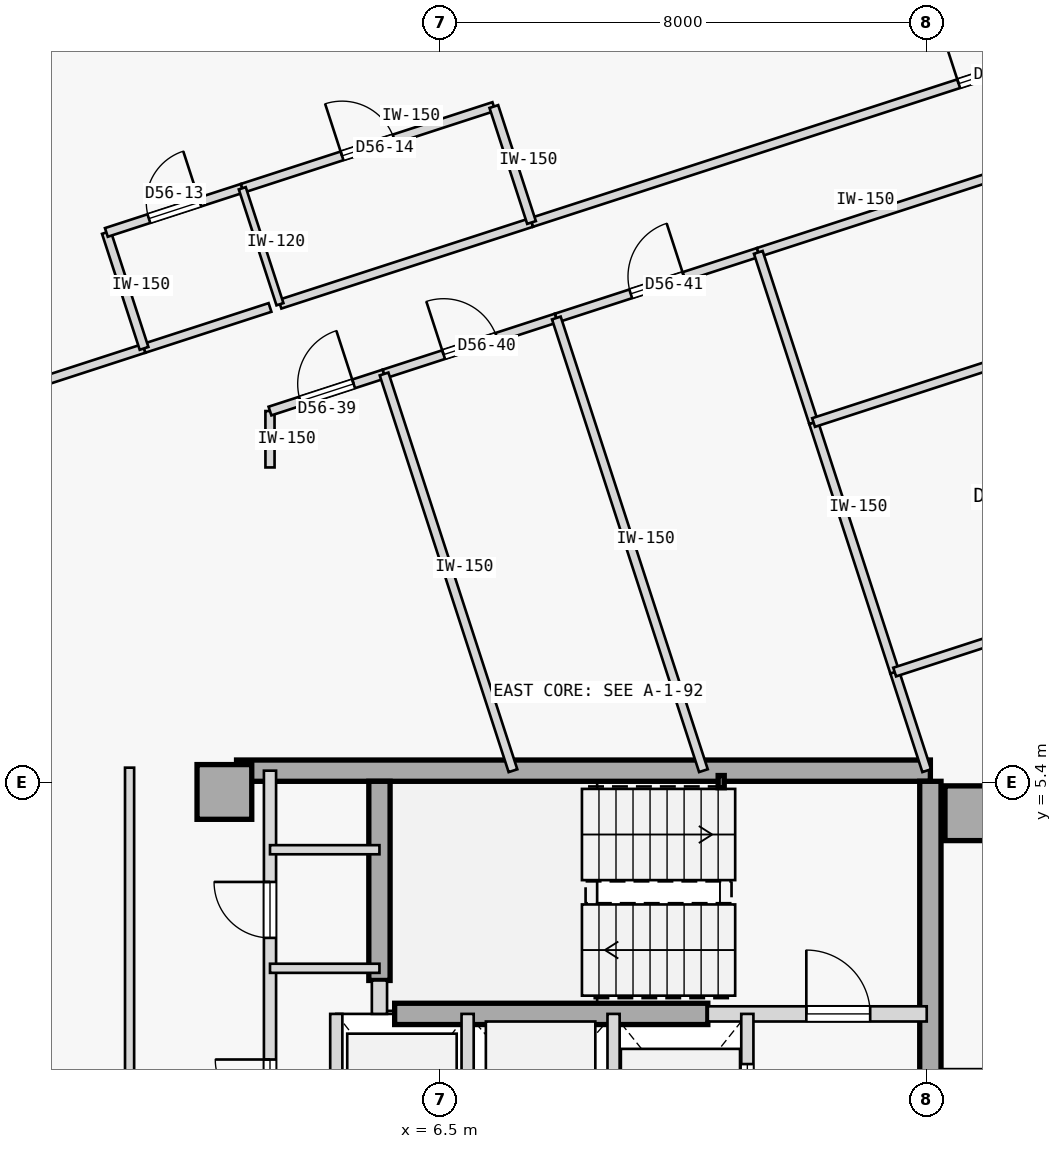
"""IFC4 building model, lengths in metres.
Left out: names, types, materials, properties, quantities, classifications, styles, units other than length and angle.
Written with IfcOpenShell. Run it as: python <this file> out.ifc"""

import sys

from ifc_helpers import new_model, si_unit, direction, frame, frame_2d, origin, origin_2d, place, context, subcontext, project, spatial, rectangle, hollow_rectangle, extrude, element, fill, save


model = new_model("IFC4")
c1 = context("Model", 3, precision=1e-05, world=origin(), true_north=direction((0.0, 1.0)))
c2 = subcontext(c1, "Body", "Model", "MODEL_VIEW")
j1 = project(units=[si_unit("LENGTHUNIT", "METRE"), si_unit("PLANEANGLEUNIT", "RADIAN")], contexts=[c1])
p1 = place(None, origin())
s1 = spatial("IfcSite", under=j1, at=p1, CompositionType="ELEMENT")
p2 = place(p1, origin())
s2 = spatial("IfcBuilding", under=s1, at=p2, CompositionType="ELEMENT")
p3 = place(p2, frame((0.0, 0.0, 214.25)))
s3 = spatial("IfcBuildingStorey", under=s2, at=p3, CompositionType="ELEMENT", Elevation=214.25)
for number, where, z_axis, x_axis in (
    (1, (15.25, 4.9, 0.0), (0.0, 0.0, 1.0), (1.0, 0.0, 0.0)),
    (2, (2.95, 5.25, 0.0), (0.0, 0.0, 1.0), (1.0, 0.0, 0.0)),
):
    element("IfcColumn", number, at=place(p3, frame(where, z_axis=z_axis, x_axis=x_axis)), inside=s3, PredefinedType="COLUMN", context=c2, shape_type="SweptSolid", body=[
        extrude(rectangle(XDim=0.9, YDim=0.9, at=origin_2d()), origin(), (0.0, 0.0, 1.0), 3.35),
    ])
p4 = place(p3, frame((3.15, 5.6, 0.0), z_axis=(0.0, 0.0, 1.0), x_axis=(1.0, 0.0, 0.0)))
e3 = element("IfcWall", 3, at=p4, inside=s3, PredefinedType="SHEAR", context=c2, shape_type="SweptSolid", body=[
    extrude(rectangle(XDim=11.41, YDim=0.35, at=frame_2d((5.705, 0.0))), origin(), (0.0, 0.0, 1.0), 3.125),
])
p5 = place(p3, frame((14.56, -5.425, 0.0), z_axis=(0.0, 0.0, 1.0), x_axis=(0.0, 1.0, 0.0)))
e4 = element("IfcWall", 4, at=p5, inside=s3, PredefinedType="SHEAR", context=c2, shape_type="SweptSolid", body=[
    extrude(rectangle(XDim=10.85, YDim=0.35, at=frame_2d((5.425, 0.0))), origin(), (0.0, 0.0, 1.0), 3.125),
])
p6 = place(p3, frame((5.5, 2.15, 0.0), z_axis=(0.0, 0.0, 1.0), x_axis=(0.0, 1.0, 0.0)))
e5 = element("IfcWall", 5, at=p6, inside=s3, PredefinedType="SHEAR", context=c2, shape_type="SweptSolid", body=[
    extrude(rectangle(XDim=3.275, YDim=0.35, at=frame_2d((1.638, 0.0))), origin(), (0.0, 0.0, 1.0), 3.125),
])
p7 = place(p3, frame((5.75, 1.6, 0.0), z_axis=(0.0, 0.0, 1.0), x_axis=(1.0, 0.0, 0.0)))
e6 = element("IfcWall", 6, at=p7, inside=s3, PredefinedType="SHEAR", context=c2, shape_type="SweptSolid", body=[
    extrude(rectangle(XDim=5.15, YDim=0.35, at=frame_2d((2.575, 0.0))), origin(), (0.0, 0.0, 1.0), 3.125),
])
p8 = place(p3, frame((11.12, 5.42, 0.0), z_axis=(0.0, 0.0, 1.0), x_axis=(1.0, 0.0, 0.0)))
e7 = element("IfcColumn", 7, at=p8, inside=s3, PredefinedType="COLUMN", context=c2, shape_type="SweptSolid", body=[
    extrude(hollow_rectangle(XDim=0.1, YDim=0.2, WallThickness=0.008, at=origin_2d()), origin(), (0.0, 0.0, 1.0), 3.35),
])
p9 = place(p3, frame((10.9, 1.6, 0.0), z_axis=(0.0, 0.0, 1.0), x_axis=(1.0, 0.0, 0.0)))
e8 = element("IfcWall", 8, at=p9, inside=s3, PredefinedType="STANDARD", context=c2, shape_type="SweptSolid", body=[
    extrude(rectangle(XDim=3.6, YDim=0.25, at=frame_2d((1.8, 0.0))), origin(), (0.0, 0.0, 1.0), 3.125),
])
p10 = place(p9, frame((1.62, 0.0, 0.0)))
e9 = element("IfcOpeningElement", 9, at=p10, cuts=e8, PredefinedType="OPENING", context=c2, shape_type="SweptSolid", body=[
    extrude(rectangle(XDim=1.05, YDim=2.15, at=frame_2d((0.525, 1.075))), frame((0.0, 0.135, 0.0), z_axis=(0.0, -1.0, 0.0), x_axis=(1.0, 0.0, 0.0)), (0.0, 0.0, 1.0), 0.27),
])
p11 = place(p3, frame((5.5, 1.6, 0.0), z_axis=(0.0, 0.0, 1.0), x_axis=(0.0, 1.0, 0.0)))
e10 = element("IfcWall", 10, at=p11, inside=s3, PredefinedType="STANDARD", context=c2, shape_type="SweptSolid", body=[
    extrude(rectangle(XDim=0.55, YDim=0.25, at=frame_2d((0.275, 0.0))), origin(), (0.0, 0.0, 1.0), 3.125),
])
p12 = place(p3, frame((3.7, -1.15, 0.0), z_axis=(0.0, 0.0, 1.0), x_axis=(0.0, 1.0, 0.0)))
e11 = element("IfcWall", 11, at=p12, inside=s3, PredefinedType="STANDARD", context=c2, shape_type="SweptSolid", body=[
    extrude(rectangle(XDim=6.75, YDim=0.2, at=frame_2d((3.375, 0.0))), origin(), (0.0, 0.0, 1.0), 3.125),
])
p13 = place(p12, frame((1.1, 0.0, 0.0)))
e12 = element("IfcOpeningElement", 12, at=p13, cuts=e11, PredefinedType="OPENING", context=c2, shape_type="SweptSolid", body=[
    extrude(rectangle(XDim=0.9, YDim=2.15, at=frame_2d((0.45, 1.075))), frame((0.0, 0.11, 0.0), z_axis=(0.0, -1.0, 0.0), x_axis=(1.0, 0.0, 0.0)), (0.0, 0.0, 1.0), 0.22),
])
p14 = place(p12, frame((4.0, 0.0, 0.0)))
e13 = element("IfcOpeningElement", 13, at=p14, cuts=e11, PredefinedType="OPENING", context=c2, shape_type="SweptSolid", body=[
    extrude(rectangle(XDim=0.92, YDim=2.15, at=frame_2d((0.46, 1.075))), frame((0.0, 0.11, 0.0), z_axis=(0.0, -1.0, 0.0), x_axis=(1.0, 0.0, 0.0)), (0.0, 0.0, 1.0), 0.22),
])
p15 = place(p3, frame((11.55, -1.15, 0.0), z_axis=(0.0, 0.0, 1.0), x_axis=(0.0, 1.0, 0.0)))
e14 = element("IfcWall", 14, at=p15, inside=s3, PredefinedType="STANDARD", context=c2, shape_type="SweptSolid", body=[
    extrude(rectangle(XDim=2.75, YDim=0.2, at=frame_2d((1.375, 0.0))), origin(), (0.0, 0.0, 1.0), 3.125),
])
p16 = place(p15, frame((0.825, 0.0, 0.0)))
e15 = element("IfcOpeningElement", 15, at=p16, cuts=e14, PredefinedType="OPENING", context=c2, shape_type="SweptSolid", body=[
    extrude(rectangle(XDim=1.1, YDim=2.15, at=frame_2d((0.55, 1.075))), frame((0.0, 0.11, 0.0), z_axis=(0.0, -1.0, 0.0), x_axis=(1.0, 0.0, 0.0)), (0.0, 0.0, 1.0), 0.22),
])
for number, where, z_axis, x_axis in (
    (16, (9.35, -1.15, 0.0), (0.0, 0.0, 1.0), (0.0, 1.0, 0.0)),
    (17, (6.95, -1.15, 0.0), (0.0, 0.0, 1.0), (0.0, 1.0, 0.0)),
    (18, (4.79, -1.15, 0.0), (0.0, 0.0, 1.0), (0.0, 1.0, 0.0)),
):
    element("IfcWall", number, at=place(p3, frame(where, z_axis=z_axis, x_axis=x_axis)), inside=s3, PredefinedType="STANDARD", context=c2, shape_type="SweptSolid", body=[
        extrude(rectangle(XDim=2.75, YDim=0.2, at=frame_2d((1.375, 0.0))), origin(), (0.0, 0.0, 1.0), 3.125),
    ])
for number, where, z_axis, x_axis in (
    (19, (3.7, 4.3, 0.0), (0.0, 0.0, 1.0), (1.0, 0.0, 0.0)),
    (20, (3.7, 2.35, 0.0), (0.0, 0.0, 1.0), (1.0, 0.0, 0.0)),
):
    element("IfcWall", number, at=place(p3, frame(where, z_axis=z_axis, x_axis=x_axis)), inside=s3, PredefinedType="PARTITIONING", context=c2, shape_type="SweptSolid", body=[
        extrude(rectangle(XDim=1.8, YDim=0.15, at=frame_2d((0.9, 0.0))), origin(), (0.0, 0.0, 1.0), 3.125),
    ])
p17 = place(p3, frame((1.391, -5.648, 0.0), z_axis=(0.0, 0.0, 1.0), x_axis=(-4.3218947e-05, 0.999999999066, 0.0)))
e21 = element("IfcWall", 21, at=p17, inside=s3, PredefinedType="PARTITIONING", context=c2, shape_type="SweptSolid", body=[
    extrude(rectangle(XDim=11.298, YDim=0.15, at=frame_2d((5.649, 0.0))), origin(), (0.0, 0.0, 1.0), 3.125),
])
p18 = place(p3, frame((-4.354, 10.601, 0.0), z_axis=(0.0, 0.0, 1.0), x_axis=(0.951050896078, 0.30903429109, 0.0)))
e22 = element("IfcWall", 22, at=p18, inside=s3, PredefinedType="PARTITIONING", context=c2, shape_type="SweptSolid", body=[
    extrude(rectangle(XDim=6.29, YDim=0.15, at=frame_2d((3.145, 0.0))), origin(), (0.0, 0.0, 1.0), 3.125),
])
p19 = place(p3, frame((8.001, 14.615, 0.0), z_axis=(0.0, 0.0, 1.0), x_axis=(0.951056661035, 0.309016548911, 0.0)))
e23 = element("IfcWall", 23, at=p19, inside=s3, PredefinedType="PARTITIONING", context=c2, shape_type="SweptSolid", body=[
    extrude(rectangle(XDim=15.722, YDim=0.15, at=frame_2d((7.861, 0.0))), origin(), (0.0, 0.0, 1.0), 3.125),
])
p20 = place(p19, frame((7.386, 0.0, 0.0)))
e24 = element("IfcOpeningElement", 24, at=p20, cuts=e23, PredefinedType="OPENING", context=c2, shape_type="SweptSolid", body=[
    extrude(rectangle(XDim=0.95, YDim=2.15, at=frame_2d((0.475, 1.075))), frame((0.0, 0.085, 0.0), z_axis=(0.0, -1.0, 0.0), x_axis=(1.0, 0.0, 0.0)), (0.0, 0.0, 1.0), 0.17),
])
p21 = place(p3, frame((1.629, 12.544, 0.0), z_axis=(0.0, 0.0, 1.0), x_axis=(0.951087596826, 0.308921321963, 0.0)))
e25 = element("IfcWall", 25, at=p21, inside=s3, PredefinedType="PARTITIONING", context=c2, shape_type="SweptSolid", body=[
    extrude(rectangle(XDim=2.178, YDim=0.15, at=frame_2d((1.089, 0.0))), origin(), (0.0, 0.0, 1.0), 3.125),
])
p22 = place(p3, frame((3.864, 13.271, 0.0), z_axis=(0.0, 0.0, 1.0), x_axis=(0.951052627573, 0.309028962374, 0.0)))
e26 = element("IfcWall", 26, at=p22, inside=s3, PredefinedType="PARTITIONING", context=c2, shape_type="SweptSolid", body=[
    extrude(rectangle(XDim=4.35, YDim=0.15, at=frame_2d((2.175, 0.0))), origin(), (0.0, 0.0, 1.0), 3.125),
])
p23 = place(p3, frame((3.7, 10.587, 0.0), z_axis=(0.0, 0.0, 1.0), x_axis=(-0.000789889169, 0.999999688038, 0.0)))
e27 = element("IfcWall", 27, at=p23, inside=s3, PredefinedType="PARTITIONING", context=c2, shape_type="SweptSolid", body=[
    extrude(rectangle(XDim=0.927, YDim=0.15, at=frame_2d((0.464, 0.0))), origin(), (0.0, 0.0, 1.0), 3.125),
])
p24 = place(p3, frame((3.699, 11.514, 0.0), z_axis=(0.0, 0.0, 1.0), x_axis=(0.951068617763, 0.308979747405, 0.0)))
e28 = element("IfcWall", 28, at=p24, inside=s3, PredefinedType="PARTITIONING", context=c2, shape_type="SweptSolid", body=[
    extrude(rectangle(XDim=1.973, YDim=0.15, at=frame_2d((0.986, 0.0))), origin(), (0.0, 0.0, 1.0), 3.125),
])
p25 = place(p24, frame((0.527, 0.0, 0.0)))
e29 = element("IfcOpeningElement", 29, at=p25, cuts=e28, PredefinedType="OPENING", context=c2, shape_type="SweptSolid", body=[
    extrude(rectangle(XDim=0.92, YDim=2.15, at=frame_2d((0.46, 1.075))), frame((0.0, 0.085, 0.0), z_axis=(0.0, -1.0, 0.0), x_axis=(1.0, 0.0, 0.0)), (0.0, 0.0, 1.0), 0.17),
])
p26 = place(p3, frame((5.576, 12.124, 0.0), z_axis=(0.0, 0.0, 1.0), x_axis=(0.951049123732, 0.309039745419, 0.0)))
e30 = element("IfcWall", 30, at=p26, inside=s3, PredefinedType="PARTITIONING", context=c2, shape_type="SweptSolid", body=[
    extrude(rectangle(XDim=2.979, YDim=0.15, at=frame_2d((1.49, 0.0))), origin(), (0.0, 0.0, 1.0), 3.125),
])
p27 = place(p26, frame((1.03, 0.0, 0.0)))
e31 = element("IfcOpeningElement", 31, at=p27, cuts=e30, PredefinedType="OPENING", context=c2, shape_type="SweptSolid", body=[
    extrude(rectangle(XDim=0.92, YDim=2.15, at=frame_2d((0.46, 1.075))), frame((0.0, 0.085, 0.0), z_axis=(0.0, -1.0, 0.0), x_axis=(1.0, 0.0, 0.0)), (0.0, 0.0, 1.0), 0.17),
])
p28 = place(p3, frame((8.409, 13.044, 0.0), z_axis=(0.0, 0.0, 1.0), x_axis=(0.951054104561, 0.309024416831, 0.0)))
e32 = element("IfcWall", 32, at=p28, inside=s3, PredefinedType="PARTITIONING", context=c2, shape_type="SweptSolid", body=[
    extrude(rectangle(XDim=3.492, YDim=0.15, at=frame_2d((1.746, 0.0))), origin(), (0.0, 0.0, 1.0), 3.125),
])
p29 = place(p28, frame((1.286, 0.0, 0.0)))
e33 = element("IfcOpeningElement", 33, at=p29, cuts=e32, PredefinedType="OPENING", context=c2, shape_type="SweptSolid", body=[
    extrude(rectangle(XDim=0.92, YDim=2.15, at=frame_2d((0.46, 1.075))), frame((0.0, 0.085, 0.0), z_axis=(0.0, -1.0, 0.0), x_axis=(1.0, 0.0, 0.0)), (0.0, 0.0, 1.0), 0.17),
])
p30 = place(p3, frame((11.73, 14.123, 0.0), z_axis=(0.0, 0.0, 1.0), x_axis=(0.951060263663, 0.309005460926, 0.0)))
e34 = element("IfcWall", 34, at=p30, inside=s3, PredefinedType="PARTITIONING", context=c2, shape_type="SweptSolid", body=[
    extrude(rectangle(XDim=12.327, YDim=0.15, at=frame_2d((6.164, 0.0))), origin(), (0.0, 0.0, 1.0), 3.125),
])
p31 = place(p30, frame((5.704, 0.0, 0.0)))
e35 = element("IfcOpeningElement", 35, at=p31, cuts=e34, PredefinedType="OPENING", context=c2, shape_type="SweptSolid", body=[
    extrude(rectangle(XDim=0.92, YDim=2.15, at=frame_2d((0.46, 1.075))), frame((0.0, 0.085, 0.0), z_axis=(0.0, -1.0, 0.0), x_axis=(1.0, 0.0, 0.0)), (0.0, 0.0, 1.0), 0.17),
])
p32 = place(p3, frame((1.629, 12.544, 0.0), z_axis=(0.0, 0.0, 1.0), x_axis=(-0.309022749039, 0.951054646472, 0.0)))
e36 = element("IfcWall", 36, at=p32, inside=s3, PredefinedType="PARTITIONING", context=c2, shape_type="SweptSolid", body=[
    extrude(rectangle(XDim=2.005, YDim=0.15, at=frame_2d((1.002, 0.0))), origin(), (0.0, 0.0, 1.0), 3.125),
])
p33 = place(p3, frame((1.009, 14.451, 0.0), z_axis=(0.0, 0.0, 1.0), x_axis=(0.951076048914, 0.308956872689, 0.0)))
e37 = element("IfcWall", 37, at=p33, inside=s3, PredefinedType="PARTITIONING", context=c2, shape_type="SweptSolid", body=[
    extrude(rectangle(XDim=2.35, YDim=0.15, at=frame_2d((1.175, 0.0))), origin(), (0.0, 0.0, 1.0), 3.125),
])
p34 = place(p33, frame((0.735, 0.0, 0.0)))
e38 = element("IfcOpeningElement", 38, at=p34, cuts=e37, PredefinedType="OPENING", context=c2, shape_type="SweptSolid", body=[
    extrude(rectangle(XDim=0.88, YDim=2.15, at=frame_2d((0.44, 1.075))), frame((0.0, 0.085, 0.0), z_axis=(0.0, -1.0, 0.0), x_axis=(1.0, 0.0, 0.0)), (0.0, 0.0, 1.0), 0.17),
])
p35 = place(p3, frame((3.244, 15.177, 0.0), z_axis=(0.0, 0.0, 1.0), x_axis=(0.951052627573, 0.309028962374, 0.0)))
e39 = element("IfcWall", 39, at=p35, inside=s3, PredefinedType="PARTITIONING", context=c2, shape_type="SweptSolid", body=[
    extrude(rectangle(XDim=4.35, YDim=0.15, at=frame_2d((2.175, 0.0))), origin(), (0.0, 0.0, 1.0), 3.125),
])
p36 = place(p35, frame((1.725, 0.0, 0.0)))
e40 = element("IfcOpeningElement", 40, at=p36, cuts=e39, PredefinedType="OPENING", context=c2, shape_type="SweptSolid", body=[
    extrude(rectangle(XDim=0.9, YDim=2.15, at=frame_2d((0.45, 1.075))), frame((0.0, 0.085, 0.0), z_axis=(0.0, -1.0, 0.0), x_axis=(1.0, 0.0, 0.0)), (0.0, 0.0, 1.0), 0.17),
])
p37 = place(p3, frame((8.001, 14.615, 0.0), z_axis=(0.0, 0.0, 1.0), x_axis=(-0.309022749039, 0.951054646472, 0.0)))
e41 = element("IfcWall", 41, at=p37, inside=s3, PredefinedType="PARTITIONING", context=c2, shape_type="SweptSolid", body=[
    extrude(rectangle(XDim=2.005, YDim=0.15, at=frame_2d((1.002, 0.0))), origin(), (0.0, 0.0, 1.0), 3.125),
])
p38 = place(p3, frame((3.864, 13.271, 0.0), z_axis=(0.0, 0.0, 1.0), x_axis=(-0.309022749039, 0.951054646472, 0.0)))
e42 = element("IfcWall", 42, at=p38, inside=s3, PredefinedType="PARTITIONING", context=c2, shape_type="SweptSolid", body=[
    extrude(rectangle(XDim=2.005, YDim=0.12, at=frame_2d((1.002, 0.0))), origin(), (0.0, 0.0, 1.0), 3.125),
])
p39 = place(p3, frame((7.696, 5.599, 0.0), z_axis=(0.0, 0.0, 1.0), x_axis=(-0.309022497646, 0.951054728157, 0.0)))
e43 = element("IfcWall", 43, at=p39, inside=s3, PredefinedType="PARTITIONING", context=c2, shape_type="SweptSolid", body=[
    extrude(rectangle(XDim=6.86, YDim=0.15, at=frame_2d((3.43, 0.0))), origin(), (0.0, 0.0, 1.0), 3.125),
])
p40 = place(p3, frame((10.828, 5.6, 0.0), z_axis=(0.0, 0.0, 1.0), x_axis=(-0.30901342663, 0.951057675519, 0.0)))
e44 = element("IfcWall", 44, at=p40, inside=s3, PredefinedType="PARTITIONING", context=c2, shape_type="SweptSolid", body=[
    extrude(rectangle(XDim=7.827, YDim=0.15, at=frame_2d((3.914, 0.0))), origin(), (0.0, 0.0, 1.0), 3.125),
])
p41 = place(p3, frame((14.5, 5.6, 0.0), z_axis=(0.0, 0.0, 1.0), x_axis=(-0.308872364299, 0.951103497298, 0.0)))
e45 = element("IfcWall", 45, at=p41, inside=s3, PredefinedType="PARTITIONING", context=c2, shape_type="SweptSolid", body=[
    extrude(rectangle(XDim=1.705, YDim=0.15, at=frame_2d((0.853, 0.0))), origin(), (0.0, 0.0, 1.0), 3.125),
])
p42 = place(p3, frame((13.973, 7.221, 0.0), z_axis=(0.0, 0.0, 1.0), x_axis=(-0.309038735568, 0.951049451879, 0.0)))
e46 = element("IfcWall", 46, at=p42, inside=s3, PredefinedType="PARTITIONING", context=c2, shape_type="SweptSolid", body=[
    extrude(rectangle(XDim=4.315, YDim=0.15, at=frame_2d((2.157, 0.0))), origin(), (0.0, 0.0, 1.0), 3.125),
])
p43 = place(p3, frame((12.639, 11.325, 0.0), z_axis=(0.0, 0.0, 1.0), x_axis=(-0.309024151982, 0.951054190618, 0.0)))
e47 = element("IfcWall", 47, at=p43, inside=s3, PredefinedType="PARTITIONING", context=c2, shape_type="SweptSolid", body=[
    extrude(rectangle(XDim=2.942, YDim=0.15, at=frame_2d((1.471, 0.0))), origin(), (0.0, 0.0, 1.0), 3.125),
])
p44 = place(p3, frame((13.973, 7.221, 0.0), z_axis=(0.0, 0.0, 1.0), x_axis=(0.951058372493, 0.309011281527, 0.0)))
e48 = element("IfcWall", 48, at=p44, inside=s3, PredefinedType="PARTITIONING", context=c2, shape_type="SweptSolid", body=[
    extrude(rectangle(XDim=12.327, YDim=0.15, at=frame_2d((6.163, 0.0))), origin(), (0.0, 0.0, 1.0), 3.125),
])
p45 = place(p44, frame((5.704, 0.0, 0.0)))
e49 = element("IfcOpeningElement", 49, at=p45, cuts=e48, PredefinedType="OPENING", context=c2, shape_type="SweptSolid", body=[
    extrude(rectangle(XDim=0.92, YDim=2.15, at=frame_2d((0.46, 1.075))), frame((0.0, 0.085, 0.0), z_axis=(0.0, -1.0, 0.0), x_axis=(1.0, 0.0, 0.0)), (0.0, 0.0, 1.0), 0.17),
])
p46 = place(p3, frame((12.639, 11.325, 0.0), z_axis=(0.0, 0.0, 1.0), x_axis=(0.951054443032, 0.309023375149, 0.0)))
e50 = element("IfcWall", 50, at=p46, inside=s3, PredefinedType="PARTITIONING", context=c2, shape_type="SweptSolid", body=[
    extrude(rectangle(XDim=12.327, YDim=0.15, at=frame_2d((6.164, 0.0))), origin(), (0.0, 0.0, 1.0), 2.675),
])
p47 = place(p10, origin())
e51 = element("IfcDoor", 51, at=p47, inside=s3, OperationType="SINGLE_SWING_LEFT", PredefinedType="DOOR", context=c2, shape_type="SweptSolid", body=[
    extrude(rectangle(XDim=1.05, YDim=2.15, at=frame_2d((0.525, 1.075))), frame((0.0, 0.025, 0.0), z_axis=(0.0, -1.0, 0.0), x_axis=(1.0, 0.0, 0.0)), (0.0, 0.0, 1.0), 0.05),
])
fill(e9, e51)
p48 = place(p16, origin())
e52 = element("IfcDoor", 52, at=p48, inside=s3, OperationType="SLIDING_TO_RIGHT", PredefinedType="DOOR", context=c2, shape_type="SweptSolid", body=[
    extrude(rectangle(XDim=1.1, YDim=2.15, at=frame_2d((0.55, 1.075))), frame((0.0, 0.025, 0.0), z_axis=(0.0, -1.0, 0.0), x_axis=(1.0, 0.0, 0.0)), (0.0, 0.0, 1.0), 0.05),
])
fill(e15, e52)
p49 = place(p13, origin())
e53 = element("IfcDoor", 53, at=p49, inside=s3, OperationType="SINGLE_SWING_RIGHT", PredefinedType="DOOR", context=c2, shape_type="SweptSolid", body=[
    extrude(rectangle(XDim=0.9, YDim=2.15, at=frame_2d((0.45, 1.075))), frame((0.0, 0.025, 0.0), z_axis=(0.0, -1.0, 0.0), x_axis=(1.0, 0.0, 0.0)), (0.0, 0.0, 1.0), 0.05),
])
fill(e12, e53)
p50 = place(p14, origin())
e54 = element("IfcDoor", 54, at=p50, inside=s3, OperationType="SINGLE_SWING_RIGHT", PredefinedType="DOOR", context=c2, shape_type="SweptSolid", body=[
    extrude(rectangle(XDim=0.92, YDim=2.15, at=frame_2d((0.46, 1.075))), frame((0.0, 0.025, 0.0), z_axis=(0.0, -1.0, 0.0), x_axis=(1.0, 0.0, 0.0)), (0.0, 0.0, 1.0), 0.05),
])
fill(e13, e54)
p51 = place(p20, origin())
e55 = element("IfcDoor", 55, at=p51, inside=s3, OperationType="SINGLE_SWING_LEFT", PredefinedType="DOOR", context=c2, shape_type="SweptSolid", body=[
    extrude(rectangle(XDim=0.95, YDim=2.15, at=frame_2d((0.475, 1.075))), frame((0.0, 0.025, 0.0), z_axis=(0.0, -1.0, 0.0), x_axis=(1.0, 0.0, 0.0)), (0.0, 0.0, 1.0), 0.05),
])
fill(e24, e55)
p52 = place(p34, origin())
e56 = element("IfcDoor", 56, at=p52, inside=s3, OperationType="SINGLE_SWING_RIGHT", PredefinedType="DOOR", context=c2, shape_type="SweptSolid", body=[
    extrude(rectangle(XDim=0.88, YDim=2.15, at=frame_2d((0.44, 1.075))), frame((0.0, 0.025, 0.0), z_axis=(0.0, -1.0, 0.0), x_axis=(1.0, 0.0, 0.0)), (0.0, 0.0, 1.0), 0.05),
])
fill(e38, e56)
p53 = place(p36, origin())
e57 = element("IfcDoor", 57, at=p53, inside=s3, OperationType="SINGLE_SWING_LEFT", PredefinedType="DOOR", context=c2, shape_type="SweptSolid", body=[
    extrude(rectangle(XDim=0.9, YDim=2.15, at=frame_2d((0.45, 1.075))), frame((0.0, 0.025, 0.0), z_axis=(0.0, -1.0, 0.0), x_axis=(1.0, 0.0, 0.0)), (0.0, 0.0, 1.0), 0.05),
])
fill(e40, e57)
p54 = place(p25, origin())
e58 = element("IfcDoor", 58, at=p54, inside=s3, OperationType="SINGLE_SWING_RIGHT", PredefinedType="DOOR", context=c2, shape_type="SweptSolid", body=[
    extrude(rectangle(XDim=0.92, YDim=2.15, at=frame_2d((0.46, 1.075))), frame((0.0, 0.025, 0.0), z_axis=(0.0, -1.0, 0.0), x_axis=(1.0, 0.0, 0.0)), (0.0, 0.0, 1.0), 0.05),
])
fill(e29, e58)
p55 = place(p27, origin())
e59 = element("IfcDoor", 59, at=p55, inside=s3, OperationType="SINGLE_SWING_LEFT", PredefinedType="DOOR", context=c2, shape_type="SweptSolid", body=[
    extrude(rectangle(XDim=0.92, YDim=2.15, at=frame_2d((0.46, 1.075))), frame((0.0, 0.025, 0.0), z_axis=(0.0, -1.0, 0.0), x_axis=(1.0, 0.0, 0.0)), (0.0, 0.0, 1.0), 0.05),
])
fill(e31, e59)
p56 = place(p29, origin())
e60 = element("IfcDoor", 60, at=p56, inside=s3, OperationType="SINGLE_SWING_RIGHT", PredefinedType="DOOR", context=c2, shape_type="SweptSolid", body=[
    extrude(rectangle(XDim=0.92, YDim=2.15, at=frame_2d((0.46, 1.075))), frame((0.0, 0.025, 0.0), z_axis=(0.0, -1.0, 0.0), x_axis=(1.0, 0.0, 0.0)), (0.0, 0.0, 1.0), 0.05),
])
fill(e33, e60)
save(model, sys.argv[1])
